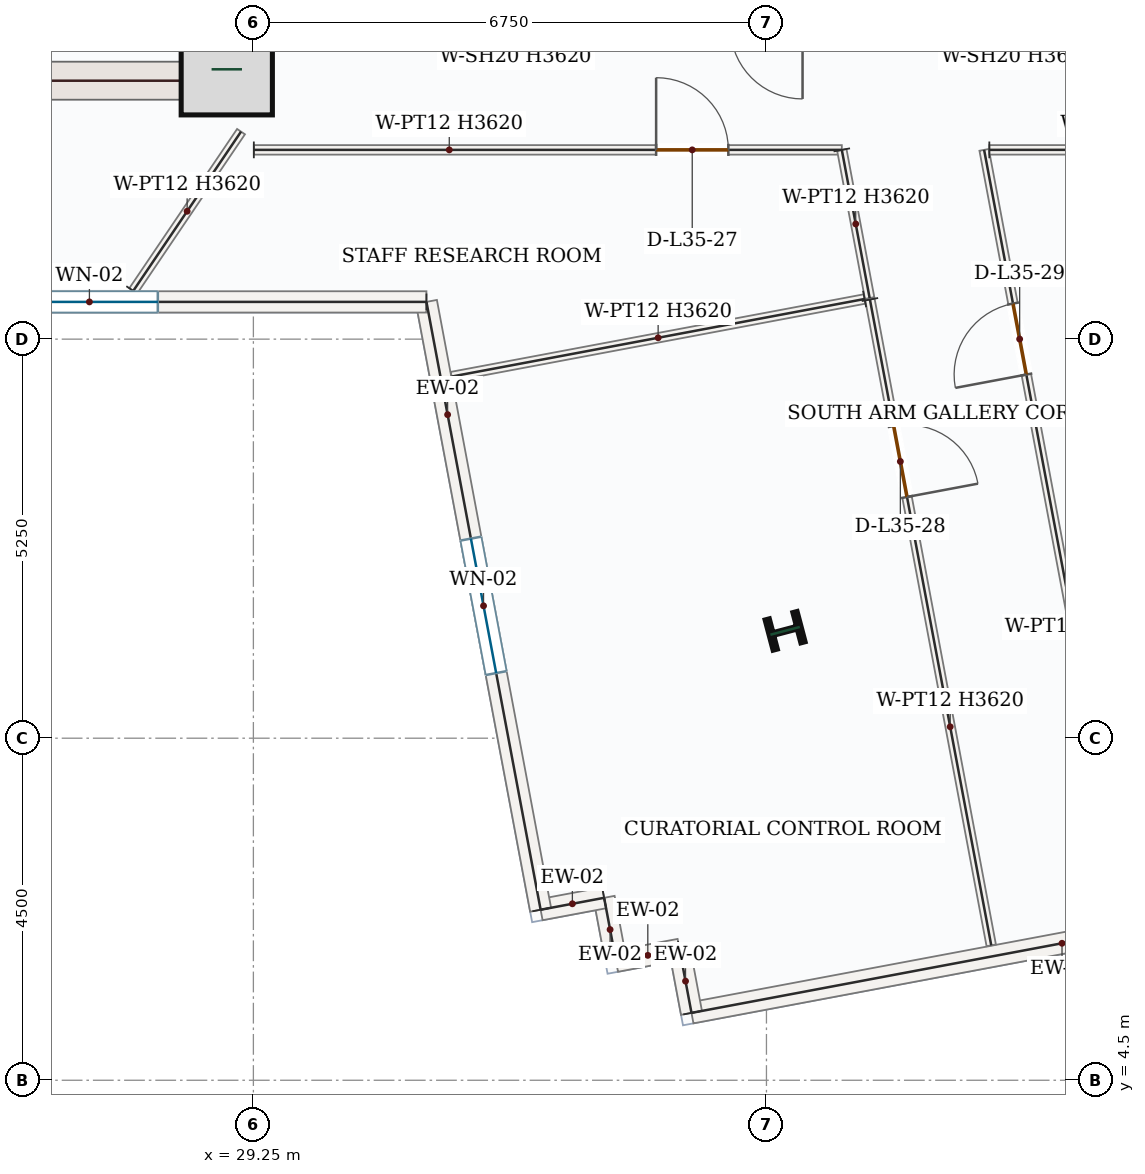
"""IFC4 building model, lengths in metres.
Left out: names, types, materials, properties, quantities, classifications, styles, units other than length and angle.
Written with IfcOpenShell. Run it as: python <this file> out.ifc"""

import sys

from ifc_helpers import new_model, si_unit, direction, frame, frame_2d, origin, origin_2d, place, context, subcontext, project, spatial, rectangle, i_section, extrude, source, transform, mapped, element, fill, save


model = new_model("IFC4")
c1 = context("Model", 3, precision=1e-05, world=origin(), true_north=direction((0.0, 1.0)))
c2 = subcontext(c1, "Body", "Model", "MODEL_VIEW")
j1 = project(units=[si_unit("LENGTHUNIT", "METRE"), si_unit("PLANEANGLEUNIT", "RADIAN")], contexts=[c1])
p1 = place(None, origin())
s1 = spatial("IfcSite", under=j1, at=p1, CompositionType="ELEMENT")
p2 = place(p1, origin())
s2 = spatial("IfcBuilding", under=s1, at=p2, CompositionType="ELEMENT")
p3 = place(p2, frame((0.0, 0.0, 155.1)))
s3 = spatial("IfcBuildingStorey", under=s2, at=p3, CompositionType="ELEMENT", Elevation=155.1)
p4 = place(p3, frame((29.0, 17.4, 0.0), z_axis=(0.0, 0.0, 1.0), x_axis=(0.0, 1.0, 0.0)))
e1 = element("IfcWall", 1, at=p4, inside=s3, PredefinedType="SHEAR", context=c2, shape_type="SweptSolid", body=[
    extrude(rectangle(XDim=8.55, YDim=0.5, at=frame_2d((4.275, 0.0))), origin(), (0.0, 0.0, 1.0), 3.62),
])
p5 = place(p4, frame((6.65, 0.0, 0.0)))
e2 = element("IfcOpeningElement", 2, at=p5, cuts=e1, PredefinedType="OPENING", context=c2, shape_type="SweptSolid", body=[
    extrude(rectangle(XDim=1.1, YDim=2.2, at=frame_2d((0.55, 1.1))), frame((0.0, 0.26, 0.0), z_axis=(0.0, -1.0, 0.0), x_axis=(1.0, 0.0, 0.0)), (0.0, 0.0, 1.0), 0.52),
])
p6 = place(p4, frame((3.15, 0.0, 0.0)))
e3 = element("IfcOpeningElement", 3, at=p6, cuts=e1, PredefinedType="OPENING", context=c2, shape_type="SweptSolid", body=[
    extrude(rectangle(XDim=0.88, YDim=2.1, at=frame_2d((0.44, 1.05))), frame((0.0, 0.26, 0.0), z_axis=(0.0, -1.0, 0.0), x_axis=(1.0, 0.0, 0.0)), (0.0, 0.0, 1.0), 0.52),
])
m1 = source(origin(), c2, "Body", "SweptSolid", [
    extrude(rectangle(XDim=7.0, YDim=0.5, at=frame_2d((3.5, 0.0))), origin(), (0.0, 0.0, 1.0), 3.62),
])
p7 = place(p3, frame((21.75, 17.65, 0.0), z_axis=(0.0, 0.0, 1.0), x_axis=(1.0, 0.0, 0.0)))
e4 = element("IfcWall", 4, at=p7, inside=s3, PredefinedType="SHEAR", context=c2, shape_type="MappedRepresentation", body=[
    mapped(m1, transform((0.0, 0.0, 0.0), x_axis=(1.0, 0.0, 0.0), y_axis=(0.0, 1.0, 0.0), z_axis=(0.0, 0.0, 1.0), scale=1.0)),
])
m2 = source(origin(), c2, "Body", "SweptSolid", [
    extrude(rectangle(XDim=1.2, YDim=1.2, at=origin_2d()), origin(), (0.0, 0.0, 1.0), 3.9),
])
p8 = place(p3, frame((28.9, 17.8, 0.0), z_axis=(0.0, 0.0, 1.0), x_axis=(1.0, 0.0, 0.0)))
e5 = element("IfcColumn", 5, at=p8, inside=s3, PredefinedType="COLUMN", context=c2, shape_type="MappedRepresentation", body=[
    mapped(m2, transform((0.0, 0.0, 0.0), x_axis=(1.0, 0.0, 0.0), y_axis=(0.0, 1.0, 0.0), z_axis=(0.0, 0.0, 1.0), scale=1.0)),
])
m3 = source(origin(), c2, "Body", "SweptSolid", [
    extrude(i_section(OverallWidth=0.412, OverallDepth=0.435, WebThickness=0.036, FlangeThickness=0.057, FilletRadius=0.018, at=origin_2d()), origin(), (0.0, 0.0, 1.0), 3.9),
])
p9 = place(p3, frame((36.245, 10.412, 0.0), z_axis=(0.0, 0.0, 1.0), x_axis=(-0.255445757936, 0.966823388604, 0.0)))
e6 = element("IfcColumn", 6, at=p9, inside=s3, PredefinedType="COLUMN", context=c2, shape_type="MappedRepresentation", body=[
    mapped(m3, transform((0.0, 0.0, 0.0), x_axis=(1.0, 0.0, 0.0), y_axis=(0.0, 1.0, 0.0), z_axis=(0.0, 0.0, 1.0), scale=1.0)),
])
m4 = source(origin(), c2, "Body", "SweptSolid", [
    extrude(rectangle(XDim=9.92, YDim=0.28, at=frame_2d((4.96, 0.0))), origin(), (0.0, 0.0, 1.0), 3.62),
])
p10 = place(p3, frame((44.763, 7.218, 0.0), z_axis=(0.0, 0.0, 1.0), x_axis=(-0.982807207568, -0.184634754994, 0.0)))
e7 = element("IfcWall", 7, at=p10, inside=s3, PredefinedType="SOLIDWALL", context=c2, shape_type="MappedRepresentation", body=[
    mapped(m4, transform((0.0, 0.0, 0.0), x_axis=(1.0, 0.0, 0.0), y_axis=(0.0, 1.0, 0.0), z_axis=(0.0, 0.0, 1.0), scale=1.0)),
])
m5 = source(origin(), c2, "Body", "SweptSolid", [
    extrude(rectangle(XDim=0.85, YDim=0.28, at=frame_2d((0.425, 0.0))), origin(), (0.0, 0.0, 1.0), 3.62),
])
for number, where, z_axis, x_axis in (
    (8, (35.014, 5.386, 0.0), (0.0, 0.0, 1.0), (-0.185, 0.983, 0.0)),
    (9, (34.857, 6.222, 0.0), (0.0, 0.0, 1.0), (-0.983, -0.185, 0.0)),
    (10, (34.021, 6.065, 0.0), (0.0, 0.0, 1.0), (-0.185, 0.983, 0.0)),
    (11, (33.865, 6.9, 0.0), (0.0, 0.0, 1.0), (-0.983, -0.185, 0.0)),
):
    element("IfcWall", number, at=place(p3, frame(where, z_axis=z_axis, x_axis=x_axis)), inside=s3, PredefinedType="SOLIDWALL", context=c2, shape_type="MappedRepresentation", body=[
        mapped(m5, transform((0.0, 0.0, 0.0), x_axis=(1.0, 0.0, 0.0), y_axis=(0.0, 1.0, 0.0), z_axis=(0.0, 0.0, 1.0), scale=1.0)),
    ])
p11 = place(p3, frame((33.029, 6.743, 0.0), z_axis=(0.0, 0.0, 1.0), x_axis=(-0.184649032166, 0.982804525285, 0.0)))
e12 = element("IfcWall", 12, at=p11, inside=s3, PredefinedType="SOLIDWALL", context=c2, shape_type="SweptSolid", body=[
    extrude(rectangle(XDim=8.137, YDim=0.28, at=frame_2d((4.068, 0.0))), origin(), (0.0, 0.0, 1.0), 3.62),
])
p12 = place(p11, frame((3.168, 0.0, 0.85)))
e13 = element("IfcOpeningElement", 13, at=p12, cuts=e12, PredefinedType="OPENING", context=c2, shape_type="SweptSolid", body=[
    extrude(rectangle(XDim=1.8, YDim=1.75, at=frame_2d((0.9, 0.875))), frame((0.0, 0.15, 0.0), z_axis=(0.0, -1.0, 0.0), x_axis=(1.0, 0.0, 0.0)), (0.0, 0.0, 1.0), 0.3),
])
p13 = place(p3, frame((31.527, 14.74, 0.0), z_axis=(0.0, 0.0, 1.0), x_axis=(-1.0, 0.0, 0.0)))
e14 = element("IfcWall", 14, at=p13, inside=s3, PredefinedType="SOLIDWALL", context=c2, shape_type="SweptSolid", body=[
    extrude(rectangle(XDim=8.869, YDim=0.28, at=frame_2d((4.434, 0.0))), origin(), (0.0, 0.0, 1.0), 3.62),
])
p14 = place(p13, frame((3.534, 0.0, 0.85)))
e15 = element("IfcOpeningElement", 15, at=p14, cuts=e14, PredefinedType="OPENING", context=c2, shape_type="SweptSolid", body=[
    extrude(rectangle(XDim=1.8, YDim=1.75, at=frame_2d((0.9, 0.875))), frame((0.0, 0.15, 0.0), z_axis=(0.0, -1.0, 0.0), x_axis=(1.0, 0.0, 0.0)), (0.0, 0.0, 1.0), 0.3),
])
p15 = place(p3, frame((29.256, 16.74, 0.0), z_axis=(0.0, 0.0, 1.0), x_axis=(1.0, 0.0, 0.0)))
e16 = element("IfcWall", 16, at=p15, inside=s3, PredefinedType="PARTITIONING", context=c2, shape_type="SweptSolid", body=[
    extrude(rectangle(XDim=7.736, YDim=0.125, at=frame_2d((3.868, 0.0))), origin(), (0.0, 0.0, 1.0), 3.62),
])
p16 = place(p15, frame((5.293, 0.0, 0.0)))
e17 = element("IfcOpeningElement", 17, at=p16, cuts=e16, PredefinedType="OPENING", context=c2, shape_type="SweptSolid", body=[
    extrude(rectangle(XDim=0.95, YDim=2.15, at=frame_2d((0.475, 1.075))), frame((0.0, 0.073, 0.0), z_axis=(0.0, -1.0, 0.0), x_axis=(1.0, 0.0, 0.0)), (0.0, 0.0, 1.0), 0.145),
])
m6 = source(origin(), c2, "Body", "SweptSolid", [
    extrude(rectangle(XDim=1.983, YDim=0.125, at=frame_2d((0.992, 0.0))), origin(), (0.0, 0.0, 1.0), 3.62),
])
p17 = place(p3, frame((36.991, 16.74, 0.0), z_axis=(0.0, 0.0, 1.0), x_axis=(0.184645271511, -0.982805231828, 0.0)))
e18 = element("IfcWall", 18, at=p17, inside=s3, PredefinedType="PARTITIONING", context=c2, shape_type="MappedRepresentation", body=[
    mapped(m6, transform((0.0, 0.0, 0.0), x_axis=(1.0, 0.0, 0.0), y_axis=(0.0, 1.0, 0.0), z_axis=(0.0, 0.0, 1.0), scale=1.0)),
])
m7 = source(origin(), c2, "Body", "SweptSolid", [
    extrude(rectangle(XDim=5.527, YDim=0.125, at=frame_2d((2.764, 0.0))), origin(), (0.0, 0.0, 1.0), 3.62),
])
p18 = place(p3, frame((37.291, 14.778, 0.0), z_axis=(0.0, 0.0, 1.0), x_axis=(-0.982808624954, -0.184627210117, 0.0)))
e19 = element("IfcWall", 19, at=p18, inside=s3, PredefinedType="PARTITIONING", context=c2, shape_type="MappedRepresentation", body=[
    mapped(m7, transform((0.0, 0.0, 0.0), x_axis=(1.0, 0.0, 0.0), y_axis=(0.0, 1.0, 0.0), z_axis=(0.0, 0.0, 1.0), scale=1.0)),
])
m8 = source(origin(), c2, "Body", "SweptSolid", [
    extrude(rectangle(XDim=2.53, YDim=0.125, at=frame_2d((1.265, 0.0))), origin(), (0.0, 0.0, 1.0), 3.62),
])
p19 = place(p3, frame((27.67, 14.885, 0.0), z_axis=(0.0, 0.0, 1.0), x_axis=(0.560455418396, 0.82818459536, 0.0)))
e20 = element("IfcWall", 20, at=p19, inside=s3, PredefinedType="PARTITIONING", context=c2, shape_type="MappedRepresentation", body=[
    mapped(m8, transform((0.0, 0.0, 0.0), x_axis=(1.0, 0.0, 0.0), y_axis=(0.0, 1.0, 0.0), z_axis=(0.0, 0.0, 1.0), scale=1.0)),
])
p20 = place(p3, frame((37.361, 14.771, 0.0), z_axis=(0.0, 0.0, 1.0), x_axis=(0.18463806937, -0.982806584908, 0.0)))
e21 = element("IfcWall", 21, at=p20, inside=s3, PredefinedType="PARTITIONING", context=c2, shape_type="SweptSolid", body=[
    extrude(rectangle(XDim=8.645, YDim=0.125, at=frame_2d((4.323, 0.0))), origin(), (0.0, 0.0, 1.0), 3.62),
])
p21 = place(p20, frame((1.693, 0.0, 0.0)))
e22 = element("IfcOpeningElement", 22, at=p21, cuts=e21, PredefinedType="OPENING", context=c2, shape_type="SweptSolid", body=[
    extrude(rectangle(XDim=0.95, YDim=2.15, at=frame_2d((0.475, 1.075))), frame((0.0, 0.073, 0.0), z_axis=(0.0, -1.0, 0.0), x_axis=(1.0, 0.0, 0.0)), (0.0, 0.0, 1.0), 0.145),
])
p22 = place(p3, frame((40.766, 6.615, 0.0), z_axis=(0.0, 0.0, 1.0), x_axis=(-0.184646211839, 0.982805055163, 0.0)))
e23 = element("IfcWall", 23, at=p22, inside=s3, PredefinedType="PARTITIONING", context=c2, shape_type="SweptSolid", body=[
    extrude(rectangle(XDim=10.303, YDim=0.125, at=frame_2d((5.151, 0.0))), origin(), (0.0, 0.0, 1.0), 3.62),
])
p23 = place(p22, frame((7.295, 0.0, 0.0)))
e24 = element("IfcOpeningElement", 24, at=p23, cuts=e23, PredefinedType="OPENING", context=c2, shape_type="SweptSolid", body=[
    extrude(rectangle(XDim=0.95, YDim=2.15, at=frame_2d((0.475, 1.075))), frame((0.0, 0.073, 0.0), z_axis=(0.0, -1.0, 0.0), x_axis=(1.0, 0.0, 0.0)), (0.0, 0.0, 1.0), 0.145),
])
m9 = source(origin(), c2, "Body", "SweptSolid", [
    extrude(rectangle(XDim=3.814, YDim=0.125, at=frame_2d((1.907, 0.0))), origin(), (0.0, 0.0, 1.0), 3.079),
])
p24 = place(p3, frame((38.932, 16.74, 0.0), z_axis=(0.0, 0.0, 1.0), x_axis=(0.999999948787, 0.000320040949, 0.0)))
e25 = element("IfcWall", 25, at=p24, inside=s3, PredefinedType="PARTITIONING", context=c2, shape_type="MappedRepresentation", body=[
    mapped(m9, transform((0.0, 0.0, 0.0), x_axis=(1.0, 0.0, 0.0), y_axis=(0.0, 1.0, 0.0), z_axis=(0.0, 0.0, 1.0), scale=1.0)),
])
m10 = source(origin(), c2, "Body", "SweptSolid", [
    extrude(rectangle(XDim=1.8, YDim=1.75, at=frame_2d((0.9, 0.875))), frame((0.0, 0.03, 0.0), z_axis=(0.0, -1.0, 0.0), x_axis=(1.0, 0.0, 0.0)), (0.0, 0.0, 1.0), 0.06),
])
p25 = place(p12, origin())
e26 = element("IfcWindow", 26, at=p25, inside=s3, PartitioningType="DOUBLE_PANEL_VERTICAL", PredefinedType="WINDOW", context=c2, shape_type="MappedRepresentation", body=[
    mapped(m10, transform((0.0, 0.0, 0.0), x_axis=(1.0, 0.0, 0.0), y_axis=(0.0, 1.0, 0.0), z_axis=(0.0, 0.0, 1.0), scale=1.0)),
])
fill(e13, e26)
p26 = place(p14, origin())
e27 = element("IfcWindow", 27, at=p26, inside=s3, PartitioningType="DOUBLE_PANEL_VERTICAL", PredefinedType="WINDOW", context=c2, shape_type="MappedRepresentation", body=[
    mapped(m10, transform((0.0, 0.0, 0.0), x_axis=(1.0, 0.0, 0.0), y_axis=(0.0, 1.0, 0.0), z_axis=(0.0, 0.0, 1.0), scale=1.0)),
])
fill(e15, e27)
m11 = source(origin(), c2, "Body", "SweptSolid", [
    extrude(rectangle(XDim=0.95, YDim=2.15, at=frame_2d((0.475, 1.075))), frame((0.0, 0.025, 0.0), z_axis=(0.0, -1.0, 0.0), x_axis=(1.0, 0.0, 0.0)), (0.0, 0.0, 1.0), 0.05),
])
p27 = place(p16, origin())
e28 = element("IfcDoor", 28, at=p27, inside=s3, OperationType="SINGLE_SWING_LEFT", PredefinedType="DOOR", context=c2, shape_type="MappedRepresentation", body=[
    mapped(m11, transform((0.0, 0.0, 0.0), x_axis=(1.0, 0.0, 0.0), y_axis=(0.0, 1.0, 0.0), z_axis=(0.0, 0.0, 1.0), scale=1.0)),
])
fill(e17, e28)
p28 = place(p21, origin())
e29 = element("IfcDoor", 29, at=p28, inside=s3, OperationType="SINGLE_SWING_RIGHT", PredefinedType="DOOR", context=c2, shape_type="MappedRepresentation", body=[
    mapped(m11, transform((0.0, 0.0, 0.0), x_axis=(1.0, 0.0, 0.0), y_axis=(0.0, 1.0, 0.0), z_axis=(0.0, 0.0, 1.0), scale=1.0)),
])
fill(e22, e29)
p29 = place(p23, origin())
e30 = element("IfcDoor", 30, at=p29, inside=s3, OperationType="SINGLE_SWING_LEFT", PredefinedType="DOOR", context=c2, shape_type="MappedRepresentation", body=[
    mapped(m11, transform((0.0, 0.0, 0.0), x_axis=(1.0, 0.0, 0.0), y_axis=(0.0, 1.0, 0.0), z_axis=(0.0, 0.0, 1.0), scale=1.0)),
])
fill(e24, e30)
save(model, sys.argv[1])
